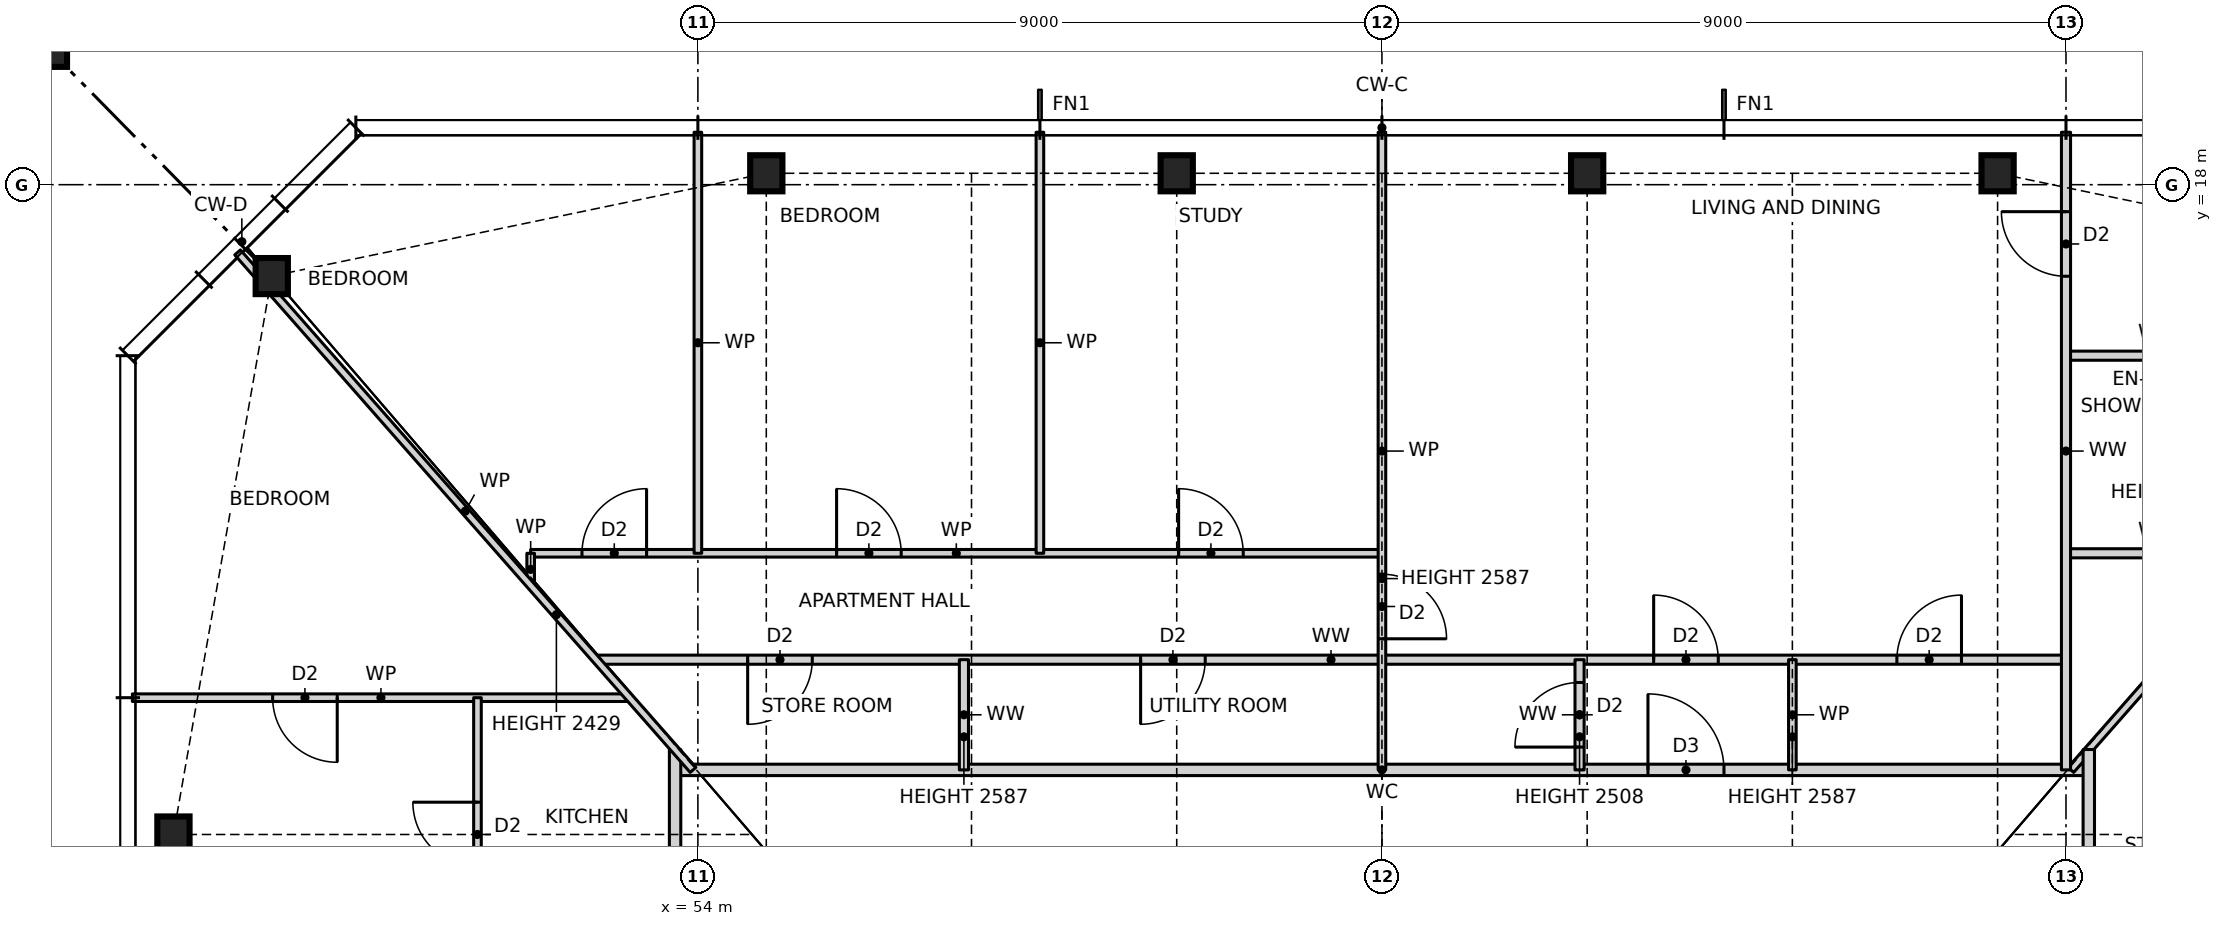
"""IFC4 building model, lengths in metres.
Left out: names, types, materials, properties, quantities, classifications, styles, units other than length and angle.
Written with IfcOpenShell. Run it as: python <this file> out.ifc"""

import sys

from ifc_helpers import new_model, si_unit, direction, frame, frame_2d, origin, origin_2d, place, context, subcontext, project, spatial, rectangle, hollow_rectangle, i_section, extrude, element, fill, save


model = new_model("IFC4")
c1 = context("Model", 3, precision=1e-05, world=origin(), true_north=direction((0.0, 1.0)))
c2 = subcontext(c1, "Body", "Model", "MODEL_VIEW")
j1 = project(units=[si_unit("LENGTHUNIT", "METRE"), si_unit("PLANEANGLEUNIT", "RADIAN")], contexts=[c1])
p1 = place(None, origin())
s1 = spatial("IfcSite", under=j1, at=p1, CompositionType="ELEMENT")
p2 = place(p1, origin())
s2 = spatial("IfcBuilding", under=s1, at=p2, CompositionType="ELEMENT")
p3 = place(p2, frame((0.0, 0.0, 50.0)))
s3 = spatial("IfcBuildingStorey", under=s2, at=p3, CompositionType="ELEMENT", Elevation=50.0)
for number, where, z_axis, x_axis in (
    (1, (71.1, 18.15, 0.0), (0.0, 0.0, 1.0), (1.0, 0.0, 0.0)),
    (2, (65.7, 18.15, 0.0), (0.0, 0.0, 1.0), (1.0, 0.0, 0.0)),
    (3, (60.3, 18.15, 0.0), (0.0, 0.0, 1.0), (1.0, 0.0, 0.0)),
    (4, (54.9, 18.15, 0.0), (0.0, 0.0, 1.0), (1.0, 0.0, 0.0)),
    (5, (48.394, 16.797, 0.0), (0.0, 0.0, 1.0), (1.0, 0.0, 0.0)),
    (6, (47.1, 9.45, 0.0), (0.0, 0.0, 1.0), (1.0, 0.0, 0.0)),
):
    element("IfcColumn", number, at=place(p3, frame(where, z_axis=z_axis, x_axis=x_axis)), inside=s3, PredefinedType="COLUMN", context=c2, shape_type="SweptSolid", body=[
        extrude(i_section(OverallWidth=0.424, OverallDepth=0.475, WebThickness=0.048, FlangeThickness=0.077, at=origin_2d()), origin(), (0.0, 0.0, 1.0), 3.5),
    ])
p4 = place(p3, frame((45.1, 20.15, 0.0), z_axis=(0.0, 0.0, 1.0), x_axis=(1.0, 0.0, 0.0)))
e7 = element("IfcColumn", 7, at=p4, inside=s3, PredefinedType="COLUMN", context=c2, shape_type="SweptSolid", body=[
    extrude(hollow_rectangle(XDim=1.2, YDim=1.2, WallThickness=0.07, at=origin_2d()), origin(), (0.0, 0.0, 1.0), 3.5),
])
p5 = place(p3, frame((53.7, 10.3, 0.0), z_axis=(0.0, 0.0, 1.0), x_axis=(1.0, 0.0, 0.0)))
e8 = element("IfcWall", 8, at=p5, inside=s3, PredefinedType="PARTITIONING", context=c2, shape_type="SweptSolid", body=[
    extrude(rectangle(XDim=18.6, YDim=0.15, at=frame_2d((9.3, 0.0))), origin(), (0.0, 0.0, 1.0), 3.27),
])
p6 = place(p5, frame((12.8, 0.0, 0.0)))
e9 = element("IfcOpeningElement", 9, at=p6, cuts=e8, PredefinedType="OPENING", context=c2, shape_type="SweptSolid", body=[
    extrude(rectangle(XDim=1.0, YDim=2.1, at=frame_2d((0.5, 1.05))), frame((0.0, 0.085, 0.0), z_axis=(0.0, -1.0, 0.0), x_axis=(1.0, 0.0, 0.0)), (0.0, 0.0, 1.0), 0.17),
])
p7 = place(p3, frame((46.56, 11.25, 0.0), z_axis=(0.0, 0.0, 1.0), x_axis=(1.0, 0.0, 0.0)))
e10 = element("IfcWall", 10, at=p7, inside=s3, PredefinedType="PARTITIONING", context=c2, shape_type="SweptSolid", body=[
    extrude(rectangle(XDim=6.54, YDim=0.1, at=frame_2d((3.27, 0.0))), origin(), (0.0, 0.0, 1.0), 3.27),
])
p8 = place(p7, frame((1.845, 0.0, 0.0)))
e11 = element("IfcOpeningElement", 11, at=p8, cuts=e10, PredefinedType="OPENING", context=c2, shape_type="SweptSolid", body=[
    extrude(rectangle(XDim=0.85, YDim=2.1, at=frame_2d((0.425, 1.05))), frame((0.0, 0.06, 0.0), z_axis=(0.0, -1.0, 0.0), x_axis=(1.0, 0.0, 0.0)), (0.0, 0.0, 1.0), 0.12),
])
p9 = place(p3, frame((52.66, 11.75, 0.0), z_axis=(0.0, 0.0, 1.0), x_axis=(1.0, 0.0, 0.0)))
e12 = element("IfcWall", 12, at=p9, inside=s3, PredefinedType="PARTITIONING", context=c2, shape_type="SweptSolid", body=[
    extrude(rectangle(XDim=19.34, YDim=0.12, at=frame_2d((9.67, 0.0))), origin(), (0.0, 0.0, 1.0), 3.27),
])
p10 = place(p9, frame((17.115, 0.0, 0.0)))
e13 = element("IfcOpeningElement", 13, at=p10, cuts=e12, PredefinedType="OPENING", context=c2, shape_type="SweptSolid", body=[
    extrude(rectangle(XDim=0.85, YDim=2.1, at=frame_2d((0.425, 1.05))), frame((0.0, 0.07, 0.0), z_axis=(0.0, -1.0, 0.0), x_axis=(1.0, 0.0, 0.0)), (0.0, 0.0, 1.0), 0.14),
])
p11 = place(p9, frame((13.915, 0.0, 0.0)))
e14 = element("IfcOpeningElement", 14, at=p11, cuts=e12, PredefinedType="OPENING", context=c2, shape_type="SweptSolid", body=[
    extrude(rectangle(XDim=0.85, YDim=2.1, at=frame_2d((0.425, 1.05))), frame((0.0, 0.07, 0.0), z_axis=(0.0, -1.0, 0.0), x_axis=(1.0, 0.0, 0.0)), (0.0, 0.0, 1.0), 0.14),
])
p12 = place(p9, frame((7.165, 0.0, 0.0)))
e15 = element("IfcOpeningElement", 15, at=p12, cuts=e12, PredefinedType="OPENING", context=c2, shape_type="SweptSolid", body=[
    extrude(rectangle(XDim=0.85, YDim=2.1, at=frame_2d((0.425, 1.05))), frame((0.0, 0.07, 0.0), z_axis=(0.0, -1.0, 0.0), x_axis=(1.0, 0.0, 0.0)), (0.0, 0.0, 1.0), 0.14),
])
p13 = place(p9, frame((1.995, 0.0, 0.0)))
e16 = element("IfcOpeningElement", 16, at=p13, cuts=e12, PredefinedType="OPENING", context=c2, shape_type="SweptSolid", body=[
    extrude(rectangle(XDim=0.85, YDim=2.1, at=frame_2d((0.425, 1.05))), frame((0.0, 0.07, 0.0), z_axis=(0.0, -1.0, 0.0), x_axis=(1.0, 0.0, 0.0)), (0.0, 0.0, 1.0), 0.14),
])
p14 = place(p3, frame((51.8, 13.15, 0.0), z_axis=(0.0, 0.0, 1.0), x_axis=(1.0, 0.0, 0.0)))
e17 = element("IfcWall", 17, at=p14, inside=s3, PredefinedType="PARTITIONING", context=c2, shape_type="SweptSolid", body=[
    extrude(rectangle(XDim=11.2, YDim=0.1, at=frame_2d((5.6, 0.0))), origin(), (0.0, 0.0, 1.0), 3.27),
])
p15 = place(p14, frame((8.525, 0.0, 0.0)))
e18 = element("IfcOpeningElement", 18, at=p15, cuts=e17, PredefinedType="OPENING", context=c2, shape_type="SweptSolid", body=[
    extrude(rectangle(XDim=0.85, YDim=2.1, at=frame_2d((0.425, 1.05))), frame((0.0, 0.06, 0.0), z_axis=(0.0, -1.0, 0.0), x_axis=(1.0, 0.0, 0.0)), (0.0, 0.0, 1.0), 0.12),
])
p16 = place(p14, frame((4.025, 0.0, 0.0)))
e19 = element("IfcOpeningElement", 19, at=p16, cuts=e17, PredefinedType="OPENING", context=c2, shape_type="SweptSolid", body=[
    extrude(rectangle(XDim=0.85, YDim=2.1, at=frame_2d((0.425, 1.05))), frame((0.0, 0.06, 0.0), z_axis=(0.0, -1.0, 0.0), x_axis=(1.0, 0.0, 0.0)), (0.0, 0.0, 1.0), 0.12),
])
p17 = place(p14, frame((0.675, 0.0, 0.0)))
e20 = element("IfcOpeningElement", 20, at=p17, cuts=e17, PredefinedType="OPENING", context=c2, shape_type="SweptSolid", body=[
    extrude(rectangle(XDim=0.85, YDim=2.1, at=frame_2d((0.425, 1.05))), frame((0.0, 0.06, 0.0), z_axis=(0.0, -1.0, 0.0), x_axis=(1.0, 0.0, 0.0)), (0.0, 0.0, 1.0), 0.12),
])
for number, where, z_axis, x_axis in (
    (21, (72.0, 13.15, 0.0), (0.0, 0.0, 1.0), (1.0, 0.0, 0.0)),
    (22, (72.0, 15.75, 0.0), (0.0, 0.0, 1.0), (1.0, 0.0, 0.0)),
):
    element("IfcWall", number, at=place(p3, frame(where, z_axis=z_axis, x_axis=x_axis)), inside=s3, PredefinedType="PARTITIONING", context=c2, shape_type="SweptSolid", body=[
        extrude(rectangle(XDim=2.4, YDim=0.12, at=frame_2d((1.2, 0.0))), origin(), (0.0, 0.0, 1.0), 3.27),
    ])
p18 = place(p3, frame((72.064, 10.3, 0.0), z_axis=(0.0, 0.0, 1.0), x_axis=(0.660700699661, 0.750649442461, 0.0)))
e23 = element("IfcWall", 23, at=p18, inside=s3, PredefinedType="PARTITIONING", context=c2, shape_type="SweptSolid", body=[
    extrude(rectangle(XDim=9.071, YDim=0.1, at=frame_2d((4.535, 0.0))), origin(), (0.0, 0.0, 1.0), 2.429),
])
p19 = place(p3, frame((72.3, -10.568, 0.0), z_axis=(0.0, 0.0, 1.0), x_axis=(0.0, 1.0, 0.0)))
e24 = element("IfcWall", 24, at=p19, inside=s3, PredefinedType="PARTITIONING", context=c2, shape_type="SweptSolid", body=[
    extrude(rectangle(XDim=21.136, YDim=0.15, at=frame_2d((10.568, 0.0))), origin(), (0.0, 0.0, 1.0), 3.27),
])
p20 = place(p19, frame((8.318, 0.0, 0.0)))
e25 = element("IfcOpeningElement", 25, at=p20, cuts=e24, PredefinedType="OPENING", context=c2, shape_type="SweptSolid", body=[
    extrude(rectangle(XDim=1.0, YDim=2.1, at=frame_2d((0.5, 1.05))), frame((0.0, 0.085, 0.0), z_axis=(0.0, -1.0, 0.0), x_axis=(1.0, 0.0, 0.0)), (0.0, 0.0, 1.0), 0.17),
])
p21 = place(p3, frame((72.0, 10.3, 0.0), z_axis=(0.0, 0.0, 1.0), x_axis=(0.0, 1.0, 0.0)))
e26 = element("IfcWall", 26, at=p21, inside=s3, PredefinedType="PARTITIONING", context=c2, shape_type="SweptSolid", body=[
    extrude(rectangle(XDim=8.39, YDim=0.12, at=frame_2d((4.195, 0.0))), origin(), (0.0, 0.0, 1.0), 3.27),
])
p22 = place(p21, frame((6.495, 0.0, 0.0)))
e27 = element("IfcOpeningElement", 27, at=p22, cuts=e26, PredefinedType="OPENING", context=c2, shape_type="SweptSolid", body=[
    extrude(rectangle(XDim=0.85, YDim=2.1, at=frame_2d((0.425, 1.05))), frame((0.0, 0.07, 0.0), z_axis=(0.0, -1.0, 0.0), x_axis=(1.0, 0.0, 0.0)), (0.0, 0.0, 1.0), 0.14),
])
p23 = place(p3, frame((68.4, 10.3, 0.0), z_axis=(0.0, 0.0, 1.0), x_axis=(0.0, 1.0, 0.0)))
e28 = element("IfcWall", 28, at=p23, inside=s3, PredefinedType="PARTITIONING", context=c2, shape_type="SweptSolid", body=[
    extrude(rectangle(XDim=1.45, YDim=0.1, at=frame_2d((0.725, 0.0))), origin(), (0.0, 0.0, 1.0), 2.587),
])
p24 = place(p3, frame((65.6, 10.3, 0.0), z_axis=(0.0, 0.0, 1.0), x_axis=(0.0, 1.0, 0.0)))
e29 = element("IfcWall", 29, at=p24, inside=s3, PredefinedType="PARTITIONING", context=c2, shape_type="SweptSolid", body=[
    extrude(rectangle(XDim=1.45, YDim=0.12, at=frame_2d((0.725, 0.0))), origin(), (0.0, 0.0, 1.0), 2.508),
])
p25 = place(p24, frame((0.3, 0.0, 0.0)))
e30 = element("IfcOpeningElement", 30, at=p25, cuts=e29, PredefinedType="OPENING", context=c2, shape_type="SweptSolid", body=[
    extrude(rectangle(XDim=0.85, YDim=2.1, at=frame_2d((0.425, 1.05))), frame((0.0, 0.07, 0.0), z_axis=(0.0, -1.0, 0.0), x_axis=(1.0, 0.0, 0.0)), (0.0, 0.0, 1.0), 0.14),
])
p26 = place(p3, frame((63.0, 10.3, 0.0), z_axis=(0.0, 0.0, 1.0), x_axis=(0.0, 1.0, 0.0)))
e31 = element("IfcWall", 31, at=p26, inside=s3, PredefinedType="PARTITIONING", context=c2, shape_type="SweptSolid", body=[
    extrude(rectangle(XDim=8.39, YDim=0.1, at=frame_2d((4.195, 0.0))), origin(), (0.0, 0.0, 1.0), 2.587),
])
p27 = place(p26, frame((1.725, 0.0, 0.0)))
e32 = element("IfcOpeningElement", 32, at=p27, cuts=e31, PredefinedType="OPENING", context=c2, shape_type="SweptSolid", body=[
    extrude(rectangle(XDim=0.85, YDim=2.1, at=frame_2d((0.425, 1.05))), frame((0.0, 0.06, 0.0), z_axis=(0.0, -1.0, 0.0), x_axis=(1.0, 0.0, 0.0)), (0.0, 0.0, 1.0), 0.12),
])
p28 = place(p3, frame((58.5, 13.15, 0.0), z_axis=(0.0, 0.0, 1.0), x_axis=(0.0, 1.0, 0.0)))
e33 = element("IfcWall", 33, at=p28, inside=s3, PredefinedType="PARTITIONING", context=c2, shape_type="SweptSolid", body=[
    extrude(rectangle(XDim=5.54, YDim=0.1, at=frame_2d((2.77, 0.0))), origin(), (0.0, 0.0, 1.0), 3.27),
])
p29 = place(p3, frame((57.5, 10.3, 0.0), z_axis=(0.0, 0.0, 1.0), x_axis=(0.0, 1.0, 0.0)))
e34 = element("IfcWall", 34, at=p29, inside=s3, PredefinedType="PARTITIONING", context=c2, shape_type="SweptSolid", body=[
    extrude(rectangle(XDim=1.45, YDim=0.12, at=frame_2d((0.725, 0.0))), origin(), (0.0, 0.0, 1.0), 2.587),
])
p30 = place(p3, frame((54.0, 13.15, 0.0), z_axis=(0.0, 0.0, 1.0), x_axis=(0.0, 1.0, 0.0)))
e35 = element("IfcWall", 35, at=p30, inside=s3, PredefinedType="PARTITIONING", context=c2, shape_type="SweptSolid", body=[
    extrude(rectangle(XDim=5.54, YDim=0.1, at=frame_2d((2.77, 0.0))), origin(), (0.0, 0.0, 1.0), 3.27),
])
p31 = place(p3, frame((53.7, -10.568, 0.0), z_axis=(0.0, 0.0, 1.0), x_axis=(0.0, 1.0, 0.0)))
e36 = element("IfcWall", 36, at=p31, inside=s3, PredefinedType="PARTITIONING", context=c2, shape_type="SweptSolid", body=[
    extrude(rectangle(XDim=21.136, YDim=0.15, at=frame_2d((10.568, 0.0))), origin(), (0.0, 0.0, 1.0), 3.27),
])
p32 = place(p31, frame((16.318, 0.0, 0.0)))
e37 = element("IfcOpeningElement", 37, at=p32, cuts=e36, PredefinedType="OPENING", context=c2, shape_type="SweptSolid", body=[
    extrude(rectangle(XDim=1.0, YDim=2.1, at=frame_2d((0.5, 1.05))), frame((0.0, 0.085, 0.0), z_axis=(0.0, -1.0, 0.0), x_axis=(1.0, 0.0, 0.0)), (0.0, 0.0, 1.0), 0.17),
])
p33 = place(p31, frame((10.918, 0.0, 0.0)))
e38 = element("IfcOpeningElement", 38, at=p33, cuts=e36, PredefinedType="OPENING", context=c2, shape_type="SweptSolid", body=[
    extrude(rectangle(XDim=1.0, YDim=2.1, at=frame_2d((0.5, 1.05))), frame((0.0, 0.085, 0.0), z_axis=(0.0, -1.0, 0.0), x_axis=(1.0, 0.0, 0.0)), (0.0, 0.0, 1.0), 0.17),
])
p34 = place(p3, frame((51.8, 12.727, 0.0), z_axis=(0.0, 0.0, 1.0), x_axis=(0.0, 1.0, 0.0)))
e39 = element("IfcWall", 39, at=p34, inside=s3, PredefinedType="PARTITIONING", context=c2, shape_type="SweptSolid", body=[
    extrude(rectangle(XDim=0.423, YDim=0.1, at=frame_2d((0.211, 0.0))), origin(), (0.0, 0.0, 1.0), 3.27),
])
p35 = place(p3, frame((51.1, 2.25, 0.0), z_axis=(0.0, 0.0, 1.0), x_axis=(0.0, 1.0, 0.0)))
e40 = element("IfcWall", 40, at=p35, inside=s3, PredefinedType="PARTITIONING", context=c2, shape_type="SweptSolid", body=[
    extrude(rectangle(XDim=9.0, YDim=0.1, at=frame_2d((4.5, 0.0))), origin(), (0.0, 0.0, 1.0), 3.27),
])
p36 = place(p35, frame((6.775, 0.0, 0.0)))
e41 = element("IfcOpeningElement", 41, at=p36, cuts=e40, PredefinedType="OPENING", context=c2, shape_type="SweptSolid", body=[
    extrude(rectangle(XDim=0.85, YDim=2.1, at=frame_2d((0.425, 1.05))), frame((0.0, 0.06, 0.0), z_axis=(0.0, -1.0, 0.0), x_axis=(1.0, 0.0, 0.0)), (0.0, 0.0, 1.0), 0.12),
])
p37 = place(p35, frame((3.575, 0.0, 0.0)))
e42 = element("IfcOpeningElement", 42, at=p37, cuts=e40, PredefinedType="OPENING", context=c2, shape_type="SweptSolid", body=[
    extrude(rectangle(XDim=0.85, YDim=2.1, at=frame_2d((0.425, 1.05))), frame((0.0, 0.06, 0.0), z_axis=(0.0, -1.0, 0.0), x_axis=(1.0, 0.0, 0.0)), (0.0, 0.0, 1.0), 0.12),
])
p38 = place(p3, frame((53.936, 10.3, 0.0), z_axis=(0.0, 0.0, 1.0), x_axis=(-0.660638210404, 0.750704439146, 0.0)))
e43 = element("IfcWall", 43, at=p38, inside=s3, PredefinedType="PARTITIONING", context=c2, shape_type="SweptSolid", body=[
    extrude(rectangle(XDim=9.07, YDim=0.1, at=frame_2d((4.535, 0.0))), origin(), (0.0, 0.0, 1.0), 2.429),
])
p39 = place(p10, origin())
e44 = element("IfcDoor", 44, at=p39, inside=s3, OperationType="SINGLE_SWING_RIGHT", PredefinedType="DOOR", context=c2, shape_type="SweptSolid", body=[
    extrude(rectangle(XDim=0.85, YDim=2.1, at=frame_2d((0.425, 1.05))), frame((0.0, 0.025, 0.0), z_axis=(0.0, -1.0, 0.0), x_axis=(1.0, 0.0, 0.0)), (0.0, 0.0, 1.0), 0.05),
])
fill(e13, e44)
p40 = place(p6, origin())
e45 = element("IfcDoor", 45, at=p40, inside=s3, OperationType="SINGLE_SWING_LEFT", PredefinedType="DOOR", context=c2, shape_type="SweptSolid", body=[
    extrude(rectangle(XDim=1.0, YDim=2.1, at=frame_2d((0.5, 1.05))), frame((0.0, 0.025, 0.0), z_axis=(0.0, -1.0, 0.0), x_axis=(1.0, 0.0, 0.0)), (0.0, 0.0, 1.0), 0.05),
])
fill(e9, e45)
p41 = place(p11, origin())
e46 = element("IfcDoor", 46, at=p41, inside=s3, OperationType="SINGLE_SWING_LEFT", PredefinedType="DOOR", context=c2, shape_type="SweptSolid", body=[
    extrude(rectangle(XDim=0.85, YDim=2.1, at=frame_2d((0.425, 1.05))), frame((0.0, 0.025, 0.0), z_axis=(0.0, -1.0, 0.0), x_axis=(1.0, 0.0, 0.0)), (0.0, 0.0, 1.0), 0.05),
])
fill(e14, e46)
p42 = place(p25, origin())
e47 = element("IfcDoor", 47, at=p42, inside=s3, OperationType="SINGLE_SWING_LEFT", PredefinedType="DOOR", context=c2, shape_type="SweptSolid", body=[
    extrude(rectangle(XDim=0.85, YDim=2.1, at=frame_2d((0.425, 1.05))), frame((0.0, 0.025, 0.0), z_axis=(0.0, -1.0, 0.0), x_axis=(1.0, 0.0, 0.0)), (0.0, 0.0, 1.0), 0.05),
])
fill(e30, e47)
p43 = place(p22, origin())
e48 = element("IfcDoor", 48, at=p43, inside=s3, OperationType="SINGLE_SWING_RIGHT", PredefinedType="DOOR", context=c2, shape_type="SweptSolid", body=[
    extrude(rectangle(XDim=0.85, YDim=2.1, at=frame_2d((0.425, 1.05))), frame((0.0, 0.025, 0.0), z_axis=(0.0, -1.0, 0.0), x_axis=(1.0, 0.0, 0.0)), (0.0, 0.0, 1.0), 0.05),
])
fill(e27, e48)
p44 = place(p27, frame((0.85, 0.0, 0.0), z_axis=(0.0, 0.0, 1.0), x_axis=(-1.0, 0.0, 0.0)))
e49 = element("IfcDoor", 49, at=p44, inside=s3, OperationType="SINGLE_SWING_RIGHT", PredefinedType="DOOR", context=c2, shape_type="SweptSolid", body=[
    extrude(rectangle(XDim=0.85, YDim=2.1, at=frame_2d((0.425, 1.05))), frame((0.0, 0.025, 0.0), z_axis=(0.0, -1.0, 0.0), x_axis=(1.0, 0.0, 0.0)), (0.0, 0.0, 1.0), 0.05),
])
fill(e32, e49)
p45 = place(p15, origin())
e50 = element("IfcDoor", 50, at=p45, inside=s3, OperationType="SINGLE_SWING_LEFT", PredefinedType="DOOR", context=c2, shape_type="SweptSolid", body=[
    extrude(rectangle(XDim=0.85, YDim=2.1, at=frame_2d((0.425, 1.05))), frame((0.0, 0.025, 0.0), z_axis=(0.0, -1.0, 0.0), x_axis=(1.0, 0.0, 0.0)), (0.0, 0.0, 1.0), 0.05),
])
fill(e18, e50)
p46 = place(p16, origin())
e51 = element("IfcDoor", 51, at=p46, inside=s3, OperationType="SINGLE_SWING_LEFT", PredefinedType="DOOR", context=c2, shape_type="SweptSolid", body=[
    extrude(rectangle(XDim=0.85, YDim=2.1, at=frame_2d((0.425, 1.05))), frame((0.0, 0.025, 0.0), z_axis=(0.0, -1.0, 0.0), x_axis=(1.0, 0.0, 0.0)), (0.0, 0.0, 1.0), 0.05),
])
fill(e19, e51)
p47 = place(p17, origin())
e52 = element("IfcDoor", 52, at=p47, inside=s3, OperationType="SINGLE_SWING_RIGHT", PredefinedType="DOOR", context=c2, shape_type="SweptSolid", body=[
    extrude(rectangle(XDim=0.85, YDim=2.1, at=frame_2d((0.425, 1.05))), frame((0.0, 0.025, 0.0), z_axis=(0.0, -1.0, 0.0), x_axis=(1.0, 0.0, 0.0)), (0.0, 0.0, 1.0), 0.05),
])
fill(e20, e52)
p48 = place(p12, frame((0.85, 0.0, 0.0), z_axis=(0.0, 0.0, 1.0), x_axis=(-1.0, 0.0, 0.0)))
e53 = element("IfcDoor", 53, at=p48, inside=s3, OperationType="SINGLE_SWING_RIGHT", PredefinedType="DOOR", context=c2, shape_type="SweptSolid", body=[
    extrude(rectangle(XDim=0.85, YDim=2.1, at=frame_2d((0.425, 1.05))), frame((0.0, 0.025, 0.0), z_axis=(0.0, -1.0, 0.0), x_axis=(1.0, 0.0, 0.0)), (0.0, 0.0, 1.0), 0.05),
])
fill(e15, e53)
p49 = place(p13, frame((0.85, 0.0, 0.0), z_axis=(0.0, 0.0, 1.0), x_axis=(-1.0, 0.0, 0.0)))
e54 = element("IfcDoor", 54, at=p49, inside=s3, OperationType="SINGLE_SWING_RIGHT", PredefinedType="DOOR", context=c2, shape_type="SweptSolid", body=[
    extrude(rectangle(XDim=0.85, YDim=2.1, at=frame_2d((0.425, 1.05))), frame((0.0, 0.025, 0.0), z_axis=(0.0, -1.0, 0.0), x_axis=(1.0, 0.0, 0.0)), (0.0, 0.0, 1.0), 0.05),
])
fill(e16, e54)
p50 = place(p36, origin())
e55 = element("IfcDoor", 55, at=p50, inside=s3, OperationType="SINGLE_SWING_RIGHT", PredefinedType="DOOR", context=c2, shape_type="SweptSolid", body=[
    extrude(rectangle(XDim=0.85, YDim=2.1, at=frame_2d((0.425, 1.05))), frame((0.0, 0.025, 0.0), z_axis=(0.0, -1.0, 0.0), x_axis=(1.0, 0.0, 0.0)), (0.0, 0.0, 1.0), 0.05),
])
fill(e41, e55)
p51 = place(p8, frame((0.85, 0.0, 0.0), z_axis=(0.0, 0.0, 1.0), x_axis=(-1.0, 0.0, 0.0)))
e56 = element("IfcDoor", 56, at=p51, inside=s3, OperationType="SINGLE_SWING_LEFT", PredefinedType="DOOR", context=c2, shape_type="SweptSolid", body=[
    extrude(rectangle(XDim=0.85, YDim=2.1, at=frame_2d((0.425, 1.05))), frame((0.0, 0.025, 0.0), z_axis=(0.0, -1.0, 0.0), x_axis=(1.0, 0.0, 0.0)), (0.0, 0.0, 1.0), 0.05),
])
fill(e11, e56)
save(model, sys.argv[1])
